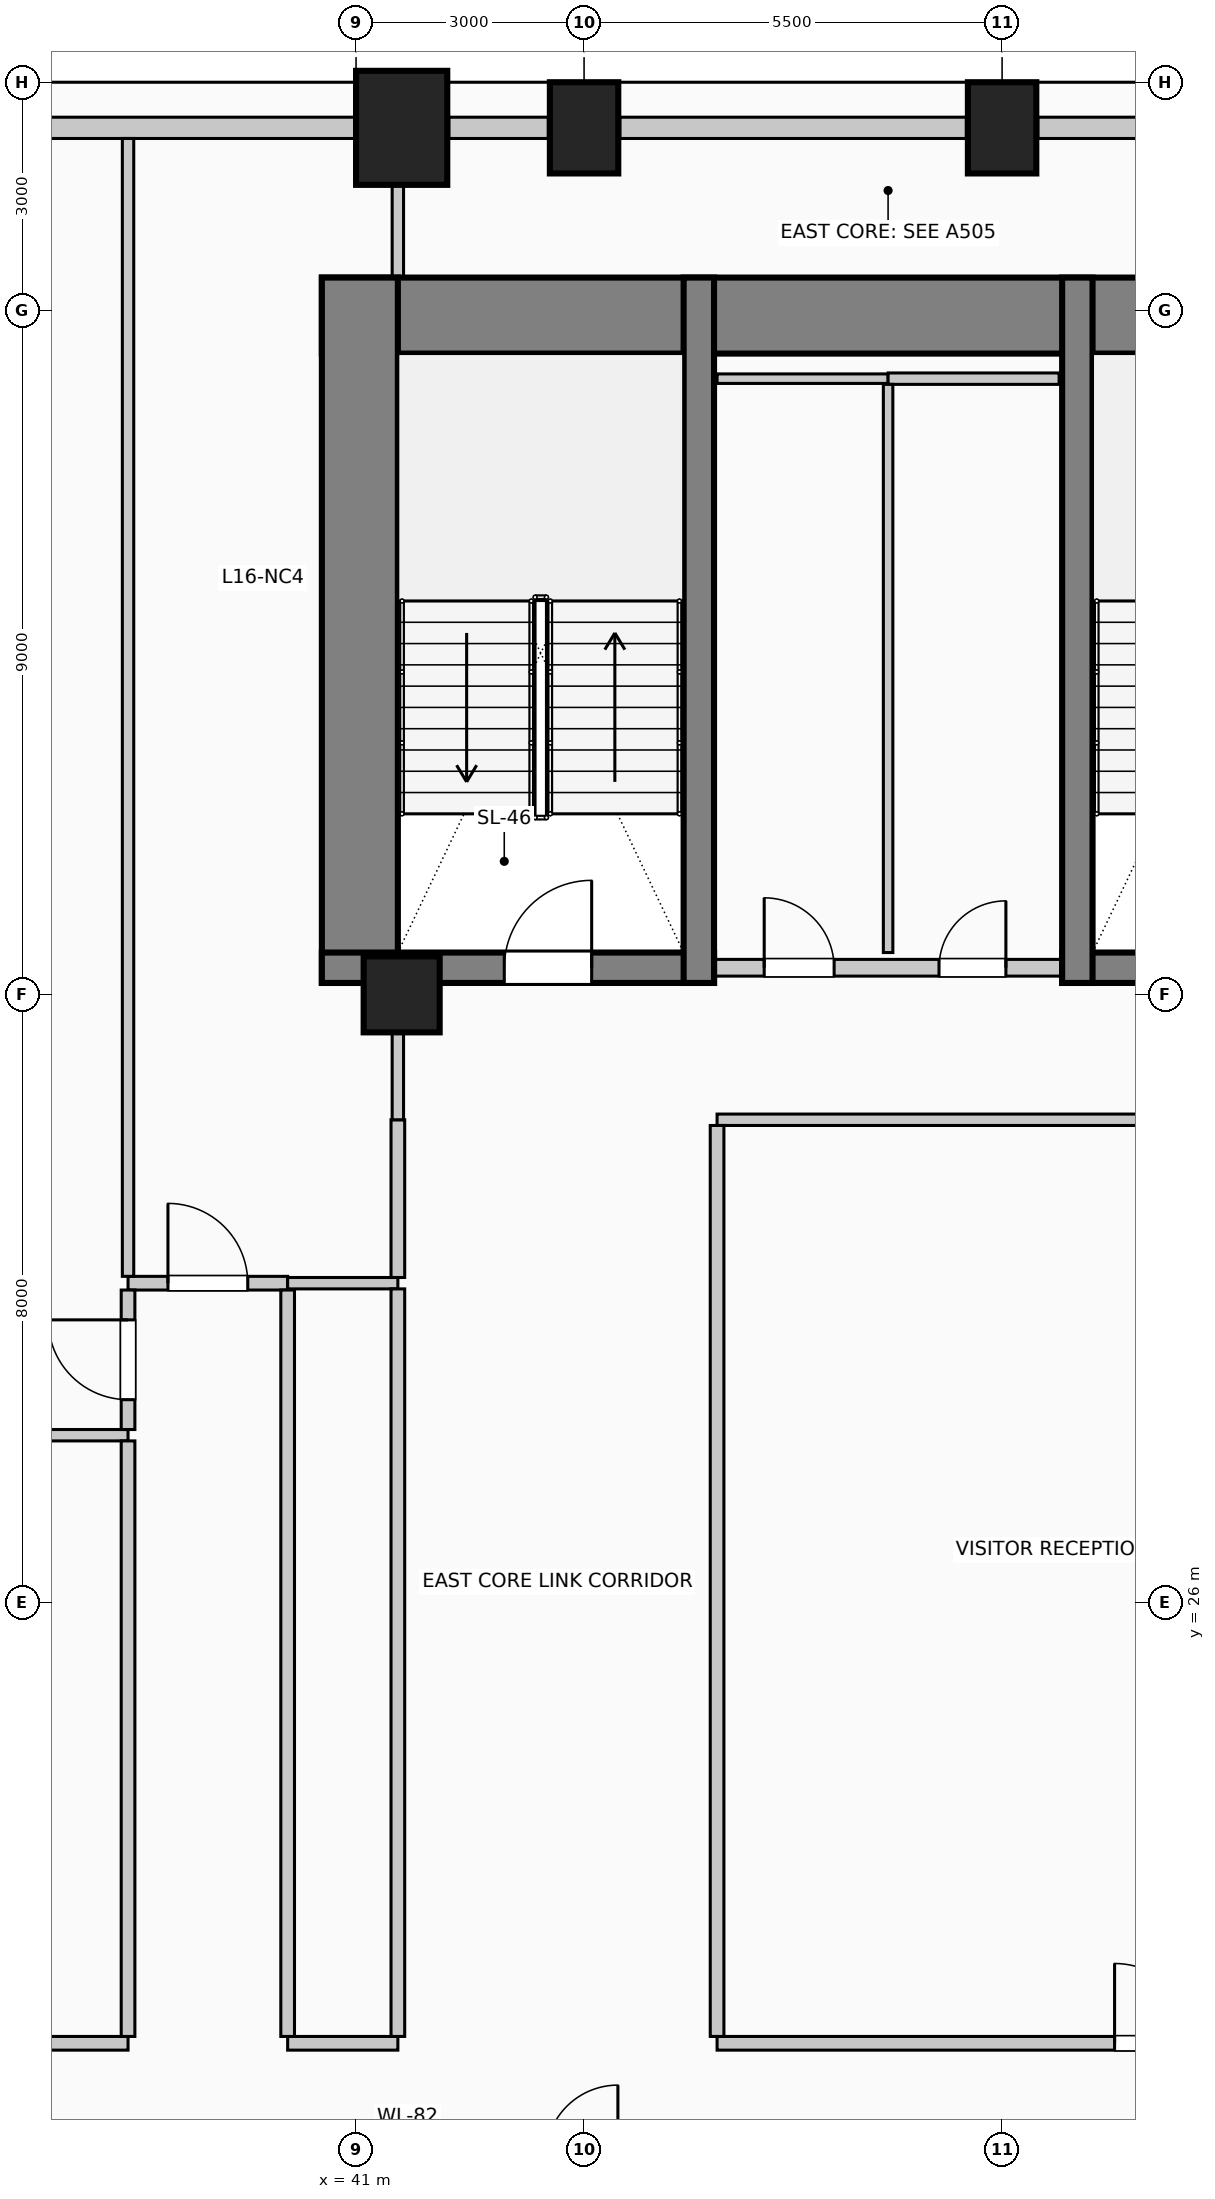
"""IFC4 building model, lengths in metres.
Left out: names, types, materials, properties, quantities, classifications, styles, units other than length and angle.
Written with IfcOpenShell. Run it as: python <this file> out.ifc"""

import sys

from ifc_helpers import new_model, si_unit, direction, frame, frame_2d, origin, origin_2d, place, context, subcontext, project, spatial, rectangle, circle, extrude, element, fill, save


model = new_model("IFC4")
c1 = context("Model", 3, precision=1e-05, world=origin(), true_north=direction((0.0, 1.0)))
c2 = subcontext(c1, "Body", "Model", "MODEL_VIEW")
j1 = project(units=[si_unit("LENGTHUNIT", "METRE"), si_unit("PLANEANGLEUNIT", "RADIAN")], contexts=[c1])
p1 = place(None, origin())
s1 = spatial("IfcSite", under=j1, at=p1, CompositionType="ELEMENT")
p2 = place(p1, origin())
s2 = spatial("IfcBuilding", under=s1, at=p2, CompositionType="ELEMENT")
p3 = place(p2, frame((0.0, 0.0, 66.6)))
s3 = spatial("IfcBuildingStorey", under=s2, at=p3, CompositionType="ELEMENT", Elevation=66.6)
p4 = place(p3, frame((40.55, 42.93, 0.0), z_axis=(0.0, 0.0, 1.0), x_axis=(1.0, 0.0, 0.0)))
e1 = element("IfcWall", 1, at=p4, inside=s3, PredefinedType="SHEAR", context=c2, shape_type="SweptSolid", body=[
    extrude(rectangle(XDim=14.9, YDim=1.0, at=frame_2d((7.45, 0.0))), origin(), (0.0, 0.0, 1.0), 4.0),
])
p5 = place(p3, frame((41.05, 34.15, 0.0), z_axis=(0.0, 0.0, 1.0), x_axis=(0.0, 1.0, 0.0)))
e2 = element("IfcWall", 2, at=p5, inside=s3, PredefinedType="SHEAR", context=c2, shape_type="SweptSolid", body=[
    extrude(rectangle(XDim=9.28, YDim=1.0, at=frame_2d((4.64, 0.0))), origin(), (0.0, 0.0, 1.0), 4.0),
])
p6 = place(p3, frame((40.55, 34.35, 0.0), z_axis=(0.0, 0.0, 1.0), x_axis=(1.0, 0.0, 0.0)))
e3 = element("IfcWall", 3, at=p6, inside=s3, PredefinedType="SHEAR", context=c2, shape_type="SweptSolid", body=[
    extrude(rectangle(XDim=5.16, YDim=0.4, at=frame_2d((2.58, 0.0))), origin(), (0.0, 0.0, 1.0), 4.0),
])
p7 = place(p6, frame((2.4, 0.0, 0.0)))
e4 = element("IfcOpeningElement", 4, at=p7, cuts=e3, PredefinedType="OPENING", context=c2, shape_type="SweptSolid", body=[
    extrude(rectangle(XDim=1.15, YDim=2.2, at=frame_2d((0.575, 1.1))), frame((0.0, 0.21, 0.0), z_axis=(0.0, -1.0, 0.0), x_axis=(1.0, 0.0, 0.0)), (0.0, 0.0, 1.0), 0.42),
])
p8 = place(p3, frame((45.51, 34.15, 0.0), z_axis=(0.0, 0.0, 1.0), x_axis=(0.0, 1.0, 0.0)))
e5 = element("IfcWall", 5, at=p8, inside=s3, PredefinedType="SHEAR", context=c2, shape_type="SweptSolid", body=[
    extrude(rectangle(XDim=9.28, YDim=0.4, at=frame_2d((4.64, 0.0))), origin(), (0.0, 0.0, 1.0), 4.0),
])
p9 = place(p3, frame((50.29, 34.35, 0.0), z_axis=(0.0, 0.0, 1.0), x_axis=(1.0, 0.0, 0.0)))
e6 = element("IfcWall", 6, at=p9, inside=s3, PredefinedType="SHEAR", context=c2, shape_type="SweptSolid", body=[
    extrude(rectangle(XDim=5.16, YDim=0.4, at=frame_2d((2.58, 0.0))), origin(), (0.0, 0.0, 1.0), 4.0),
])
p10 = place(p9, frame((1.4, 0.0, 0.0)))
e7 = element("IfcOpeningElement", 7, at=p10, cuts=e6, PredefinedType="OPENING", context=c2, shape_type="SweptSolid", body=[
    extrude(rectangle(XDim=1.15, YDim=2.2, at=frame_2d((0.575, 1.1))), frame((0.0, 0.21, 0.0), z_axis=(0.0, -1.0, 0.0), x_axis=(1.0, 0.0, 0.0)), (0.0, 0.0, 1.0), 0.42),
])
p11 = place(p3, frame((50.49, 34.15, 0.0), z_axis=(0.0, 0.0, 1.0), x_axis=(0.0, 1.0, 0.0)))
e8 = element("IfcWall", 8, at=p11, inside=s3, PredefinedType="SHEAR", context=c2, shape_type="SweptSolid", body=[
    extrude(rectangle(XDim=9.28, YDim=0.4, at=frame_2d((4.64, 0.0))), origin(), (0.0, 0.0, 1.0), 4.0),
])
p12 = place(p3, frame((41.6, 45.4, 0.0), z_axis=(0.0, 0.0, 1.0), x_axis=(1.0, 0.0, 0.0)))
e9 = element("IfcColumn", 9, at=p12, inside=s3, PredefinedType="COLUMN", context=c2, shape_type="SweptSolid", body=[
    extrude(rectangle(XDim=1.2, YDim=1.5, at=origin_2d()), origin(), (0.0, 0.0, 1.0), 4.0),
])
for number, where, z_axis, x_axis in (
    (10, (44.0, 45.4, 0.0), (0.0, 0.0, 1.0), (1.0, 0.0, 0.0)),
    (11, (49.5, 45.4, 0.0), (0.0, 0.0, 1.0), (1.0, 0.0, 0.0)),
):
    element("IfcColumn", number, at=place(p3, frame(where, z_axis=z_axis, x_axis=x_axis)), inside=s3, PredefinedType="COLUMN", context=c2, shape_type="SweptSolid", body=[
        extrude(rectangle(XDim=0.9, YDim=1.2, at=origin_2d()), origin(), (0.0, 0.0, 1.0), 4.0),
    ])
p13 = place(p3, frame((41.6, 34.0, 0.0), z_axis=(0.0, 0.0, 1.0), x_axis=(1.0, 0.0, 0.0)))
e12 = element("IfcColumn", 12, at=p13, inside=s3, PredefinedType="COLUMN", context=c2, shape_type="SweptSolid", body=[
    extrude(circle(Radius=0.5, at=origin_2d()), origin(), (0.0, 0.0, 1.0), 4.0),
])
p14 = place(p3, frame((34.62, 45.4, 0.0), z_axis=(0.0, 0.0, 1.0), x_axis=(1.0, 0.0, 0.0)))
e13 = element("IfcWall", 13, at=p14, inside=s3, PredefinedType="SOLIDWALL", context=c2, shape_type="SweptSolid", body=[
    extrude(rectangle(XDim=6.36, YDim=0.28, at=frame_2d((3.18, 0.0))), origin(), (0.0, 0.0, 1.0), 2.85),
])
p15 = place(p3, frame((42.22, 45.4, 0.0), z_axis=(0.0, 0.0, 1.0), x_axis=(1.0, 0.0, 0.0)))
e14 = element("IfcWall", 14, at=p15, inside=s3, PredefinedType="SOLIDWALL", context=c2, shape_type="SweptSolid", body=[
    extrude(rectangle(XDim=1.31, YDim=0.28, at=frame_2d((0.655, 0.0))), origin(), (0.0, 0.0, 1.0), 2.85),
])
p16 = place(p3, frame((44.47, 45.4, 0.0), z_axis=(0.0, 0.0, 1.0), x_axis=(1.0, 0.0, 0.0)))
e15 = element("IfcWall", 15, at=p16, inside=s3, PredefinedType="SOLIDWALL", context=c2, shape_type="SweptSolid", body=[
    extrude(rectangle(XDim=4.56, YDim=0.28, at=frame_2d((2.28, 0.0))), origin(), (0.0, 0.0, 1.0), 2.85),
])
p17 = place(p3, frame((49.97, 45.4, 0.0), z_axis=(0.0, 0.0, 1.0), x_axis=(1.0, 0.0, 0.0)))
e16 = element("IfcWall", 16, at=p17, inside=s3, PredefinedType="SOLIDWALL", context=c2, shape_type="SweptSolid", body=[
    extrude(rectangle(XDim=3.96, YDim=0.28, at=frame_2d((1.98, 0.0))), origin(), (0.0, 0.0, 1.0), 2.85),
])
p18 = place(p3, frame((45.72, 34.35, 0.0), z_axis=(0.0, 0.0, 1.0), x_axis=(1.0, 0.0, 0.0)))
e17 = element("IfcWall", 17, at=p18, inside=s3, PredefinedType="PARTITIONING", context=c2, shape_type="SweptSolid", body=[
    extrude(rectangle(XDim=4.56, YDim=0.22, at=frame_2d((2.28, 0.0))), origin(), (0.0, 0.0, 1.0), 3.7),
])
p19 = place(p18, frame((0.65, 0.0, 0.0)))
e18 = element("IfcOpeningElement", 18, at=p19, cuts=e17, PredefinedType="OPENING", context=c2, shape_type="SweptSolid", body=[
    extrude(rectangle(XDim=0.92, YDim=2.1, at=frame_2d((0.46, 1.05))), frame((0.0, 0.12, 0.0), z_axis=(0.0, -1.0, 0.0), x_axis=(1.0, 0.0, 0.0)), (0.0, 0.0, 1.0), 0.24),
])
p20 = place(p18, frame((2.95, 0.0, 0.0)))
e19 = element("IfcOpeningElement", 19, at=p20, cuts=e17, PredefinedType="OPENING", context=c2, shape_type="SweptSolid", body=[
    extrude(rectangle(XDim=0.88, YDim=2.1, at=frame_2d((0.44, 1.05))), frame((0.0, 0.12, 0.0), z_axis=(0.0, -1.0, 0.0), x_axis=(1.0, 0.0, 0.0)), (0.0, 0.0, 1.0), 0.24),
])
p21 = place(p3, frame((16.65, 20.2, 0.0), z_axis=(0.0, 0.0, 1.0), x_axis=(1.0, 0.0, 0.0)))
e20 = element("IfcWall", 20, at=p21, inside=s3, PredefinedType="PARTITIONING", context=c2, shape_type="SweptSolid", body=[
    extrude(rectangle(XDim=21.35, YDim=0.18, at=frame_2d((10.675, 0.0))), origin(), (0.0, 0.0, 1.0), 3.7),
])
p22 = place(p21, frame((10.15, 0.0, 0.0)))
e21 = element("IfcOpeningElement", 21, at=p22, cuts=e20, PredefinedType="OPENING", context=c2, shape_type="SweptSolid", body=[
    extrude(rectangle(XDim=1.05, YDim=2.15, at=frame_2d((0.525, 1.075))), frame((0.0, 0.1, 0.0), z_axis=(0.0, -1.0, 0.0), x_axis=(1.0, 0.0, 0.0)), (0.0, 0.0, 1.0), 0.2),
])
p23 = place(p3, frame((40.1, 20.2, 0.0), z_axis=(0.0, 0.0, 1.0), x_axis=(1.0, 0.0, 0.0)))
e22 = element("IfcWall", 22, at=p23, inside=s3, PredefinedType="PARTITIONING", context=c2, shape_type="SweptSolid", body=[
    extrude(rectangle(XDim=1.45, YDim=0.18, at=frame_2d((0.725, 0.0))), origin(), (0.0, 0.0, 1.0), 3.7),
])
p24 = place(p3, frame((45.75, 20.2, 0.0), z_axis=(0.0, 0.0, 1.0), x_axis=(1.0, 0.0, 0.0)))
e23 = element("IfcWall", 23, at=p24, inside=s3, PredefinedType="PARTITIONING", context=c2, shape_type="SweptSolid", body=[
    extrude(rectangle(XDim=11.51, YDim=0.18, at=frame_2d((5.755, 0.0))), origin(), (0.0, 0.0, 1.0), 3.7),
])
p25 = place(p24, frame((5.23, 0.0, 0.0)))
e24 = element("IfcOpeningElement", 24, at=p25, cuts=e23, PredefinedType="OPENING", context=c2, shape_type="SweptSolid", body=[
    extrude(rectangle(XDim=1.05, YDim=2.15, at=frame_2d((0.525, 1.075))), frame((0.0, 0.1, 0.0), z_axis=(0.0, -1.0, 0.0), x_axis=(1.0, 0.0, 0.0)), (0.0, 0.0, 1.0), 0.2),
])
p26 = place(p3, frame((16.65, 28.2, 0.0), z_axis=(0.0, 0.0, 1.0), x_axis=(1.0, 0.0, 0.0)))
e25 = element("IfcWall", 25, at=p26, inside=s3, PredefinedType="PARTITIONING", context=c2, shape_type="SweptSolid", body=[
    extrude(rectangle(XDim=21.35, YDim=0.15, at=frame_2d((10.675, 0.0))), origin(), (0.0, 0.0, 1.0), 3.7),
])
p27 = place(p3, frame((38.0, 30.2, 0.0), z_axis=(0.0, 0.0, 1.0), x_axis=(1.0, 0.0, 0.0)))
e26 = element("IfcWall", 26, at=p27, inside=s3, PredefinedType="PARTITIONING", context=c2, shape_type="SweptSolid", body=[
    extrude(rectangle(XDim=2.1, YDim=0.18, at=frame_2d((1.05, 0.0))), origin(), (0.0, 0.0, 1.0), 3.7),
])
p28 = place(p27, frame((0.525, 0.0, 0.0)))
e27 = element("IfcOpeningElement", 27, at=p28, cuts=e26, PredefinedType="OPENING", context=c2, shape_type="SweptSolid", body=[
    extrude(rectangle(XDim=1.05, YDim=2.15, at=frame_2d((0.525, 1.075))), frame((0.0, 0.1, 0.0), z_axis=(0.0, -1.0, 0.0), x_axis=(1.0, 0.0, 0.0)), (0.0, 0.0, 1.0), 0.2),
])
p29 = place(p3, frame((40.1, 30.2, 0.0), z_axis=(0.0, 0.0, 1.0), x_axis=(1.0, 0.0, 0.0)))
e28 = element("IfcWall", 28, at=p29, inside=s3, PredefinedType="PARTITIONING", context=c2, shape_type="SweptSolid", body=[
    extrude(rectangle(XDim=1.45, YDim=0.15, at=frame_2d((0.725, 0.0))), origin(), (0.0, 0.0, 1.0), 3.7),
])
p30 = place(p3, frame((45.75, 32.35, 0.0), z_axis=(0.0, 0.0, 1.0), x_axis=(1.0, 0.0, 0.0)))
e29 = element("IfcWall", 29, at=p30, inside=s3, PredefinedType="PARTITIONING", context=c2, shape_type="SweptSolid", body=[
    extrude(rectangle(XDim=8.7, YDim=0.15, at=frame_2d((4.35, 0.0))), origin(), (0.0, 0.0, 1.0), 3.7),
])
p31 = place(p3, frame((45.75, 42.1, 0.0), z_axis=(0.0, 0.0, 1.0), x_axis=(1.0, 0.0, 0.0)))
e30 = element("IfcWall", 30, at=p31, inside=s3, PredefinedType="PARTITIONING", context=c2, shape_type="SweptSolid", body=[
    extrude(rectangle(XDim=2.25, YDim=0.125, at=frame_2d((1.125, 0.0))), origin(), (0.0, 0.0, 1.0), 3.7),
])
p32 = place(p3, frame((48.0, 42.1, 0.0), z_axis=(0.0, 0.0, 1.0), x_axis=(1.0, 0.0, 0.0)))
e31 = element("IfcWall", 31, at=p32, inside=s3, PredefinedType="PARTITIONING", context=c2, shape_type="SweptSolid", body=[
    extrude(rectangle(XDim=2.25, YDim=0.15, at=frame_2d((1.125, 0.0))), origin(), (0.0, 0.0, 1.0), 3.7),
])
p33 = place(p3, frame((38.0, 20.29, 0.0), z_axis=(0.0, 0.0, 1.0), x_axis=(0.0, 1.0, 0.0)))
e32 = element("IfcWall", 32, at=p33, inside=s3, PredefinedType="PARTITIONING", context=c2, shape_type="SweptSolid", body=[
    extrude(rectangle(XDim=7.835, YDim=0.18, at=frame_2d((3.917, 0.0))), origin(), (0.0, 0.0, 1.0), 3.7),
])
p34 = place(p3, frame((38.0, 28.275, 0.0), z_axis=(0.0, 0.0, 1.0), x_axis=(0.0, 1.0, 0.0)))
e33 = element("IfcWall", 33, at=p34, inside=s3, PredefinedType="PARTITIONING", context=c2, shape_type="SweptSolid", body=[
    extrude(rectangle(XDim=1.835, YDim=0.18, at=frame_2d((0.917, 0.0))), origin(), (0.0, 0.0, 1.0), 3.7),
])
p35 = place(p34, frame((0.393, 0.0, 0.0)))
e34 = element("IfcOpeningElement", 34, at=p35, cuts=e33, PredefinedType="OPENING", context=c2, shape_type="SweptSolid", body=[
    extrude(rectangle(XDim=1.05, YDim=2.15, at=frame_2d((0.525, 1.075))), frame((0.0, 0.1, 0.0), z_axis=(0.0, -1.0, 0.0), x_axis=(1.0, 0.0, 0.0)), (0.0, 0.0, 1.0), 0.2),
])
p36 = place(p3, frame((38.0, 30.29, 0.0), z_axis=(0.0, 0.0, 1.0), x_axis=(0.0, 1.0, 0.0)))
e35 = element("IfcWall", 35, at=p36, inside=s3, PredefinedType="PARTITIONING", context=c2, shape_type="SweptSolid", body=[
    extrude(rectangle(XDim=14.97, YDim=0.15, at=frame_2d((7.485, 0.0))), origin(), (0.0, 0.0, 1.0), 3.7),
])
p37 = place(p3, frame((40.1, 20.29, 0.0), z_axis=(0.0, 0.0, 1.0), x_axis=(0.0, 1.0, 0.0)))
e36 = element("IfcWall", 36, at=p37, inside=s3, PredefinedType="PARTITIONING", context=c2, shape_type="SweptSolid", body=[
    extrude(rectangle(XDim=9.82, YDim=0.18, at=frame_2d((4.91, 0.0))), origin(), (0.0, 0.0, 1.0), 3.7),
])
p38 = place(p3, frame((41.55, 20.29, 0.0), z_axis=(0.0, 0.0, 1.0), x_axis=(0.0, 1.0, 0.0)))
e37 = element("IfcWall", 37, at=p38, inside=s3, PredefinedType="PARTITIONING", context=c2, shape_type="SweptSolid", body=[
    extrude(rectangle(XDim=9.835, YDim=0.18, at=frame_2d((4.917, 0.0))), origin(), (0.0, 0.0, 1.0), 2.995),
])
p39 = place(p3, frame((41.55, 30.275, 0.0), z_axis=(0.0, 0.0, 1.0), x_axis=(0.0, 1.0, 0.0)))
e38 = element("IfcWall", 38, at=p39, inside=s3, PredefinedType="PARTITIONING", context=c2, shape_type="SweptSolid", body=[
    extrude(rectangle(XDim=2.075, YDim=0.18, at=frame_2d((1.038, 0.0))), origin(), (0.0, 0.0, 1.0), 2.995),
])
p40 = place(p3, frame((41.55, 32.35, 0.0), z_axis=(0.0, 0.0, 1.0), x_axis=(0.0, 1.0, 0.0)))
e39 = element("IfcWall", 39, at=p40, inside=s3, PredefinedType="PARTITIONING", context=c2, shape_type="SweptSolid", body=[
    extrude(rectangle(XDim=1.15, YDim=0.15, at=frame_2d((0.575, 0.0))), origin(), (0.0, 0.0, 1.0), 2.995),
])
p41 = place(p3, frame((41.55, 43.43, 0.0), z_axis=(0.0, 0.0, 1.0), x_axis=(0.0, 1.0, 0.0)))
e40 = element("IfcWall", 40, at=p41, inside=s3, PredefinedType="PARTITIONING", context=c2, shape_type="SweptSolid", body=[
    extrude(rectangle(XDim=1.22, YDim=0.15, at=frame_2d((0.61, 0.0))), origin(), (0.0, 0.0, 1.0), 3.7),
])
p42 = place(p3, frame((45.75, 20.29, 0.0), z_axis=(0.0, 0.0, 1.0), x_axis=(0.0, 1.0, 0.0)))
e41 = element("IfcWall", 41, at=p42, inside=s3, PredefinedType="PARTITIONING", context=c2, shape_type="SweptSolid", body=[
    extrude(rectangle(XDim=11.985, YDim=0.18, at=frame_2d((5.992, 0.0))), origin(), (0.0, 0.0, 1.0), 3.7),
])
p43 = place(p3, frame((48.0, 34.55, 0.0), z_axis=(0.0, 0.0, 1.0), x_axis=(0.0, 1.0, 0.0)))
e42 = element("IfcWall", 42, at=p43, inside=s3, PredefinedType="PARTITIONING", context=c2, shape_type="SweptSolid", body=[
    extrude(rectangle(XDim=7.475, YDim=0.125, at=frame_2d((3.737, 0.0))), origin(), (0.0, 0.0, 1.0), 3.7),
])
p44 = place(p7, origin())
e43 = element("IfcDoor", 43, at=p44, inside=s3, OperationType="SINGLE_SWING_RIGHT", PredefinedType="DOOR", context=c2, shape_type="SweptSolid", body=[
    extrude(rectangle(XDim=1.15, YDim=2.2, at=frame_2d((0.575, 1.1))), frame((0.0, 0.025, 0.0), z_axis=(0.0, -1.0, 0.0), x_axis=(1.0, 0.0, 0.0)), (0.0, 0.0, 1.0), 0.05),
])
fill(e4, e43)
p45 = place(p19, origin())
e44 = element("IfcDoor", 44, at=p45, inside=s3, OperationType="SINGLE_SWING_LEFT", PredefinedType="DOOR", context=c2, shape_type="SweptSolid", body=[
    extrude(rectangle(XDim=0.92, YDim=2.1, at=frame_2d((0.46, 1.05))), frame((0.0, 0.025, 0.0), z_axis=(0.0, -1.0, 0.0), x_axis=(1.0, 0.0, 0.0)), (0.0, 0.0, 1.0), 0.05),
])
fill(e18, e44)
p46 = place(p20, origin())
e45 = element("IfcDoor", 45, at=p46, inside=s3, OperationType="SINGLE_SWING_RIGHT", PredefinedType="DOOR", context=c2, shape_type="SweptSolid", body=[
    extrude(rectangle(XDim=0.88, YDim=2.1, at=frame_2d((0.44, 1.05))), frame((0.0, 0.025, 0.0), z_axis=(0.0, -1.0, 0.0), x_axis=(1.0, 0.0, 0.0)), (0.0, 0.0, 1.0), 0.05),
])
fill(e19, e45)
p47 = place(p25, origin())
e46 = element("IfcDoor", 46, at=p47, inside=s3, OperationType="SINGLE_SWING_LEFT", PredefinedType="DOOR", context=c2, shape_type="SweptSolid", body=[
    extrude(rectangle(XDim=1.05, YDim=2.15, at=frame_2d((0.525, 1.075))), frame((0.0, 0.025, 0.0), z_axis=(0.0, -1.0, 0.0), x_axis=(1.0, 0.0, 0.0)), (0.0, 0.0, 1.0), 0.05),
])
fill(e24, e46)
p48 = place(p28, origin())
e47 = element("IfcDoor", 47, at=p48, inside=s3, OperationType="SINGLE_SWING_LEFT", PredefinedType="DOOR", context=c2, shape_type="SweptSolid", body=[
    extrude(rectangle(XDim=1.05, YDim=2.15, at=frame_2d((0.525, 1.075))), frame((0.0, 0.025, 0.0), z_axis=(0.0, -1.0, 0.0), x_axis=(1.0, 0.0, 0.0)), (0.0, 0.0, 1.0), 0.05),
])
fill(e27, e47)
p49 = place(p35, origin())
e48 = element("IfcDoor", 48, at=p49, inside=s3, OperationType="SINGLE_SWING_RIGHT", PredefinedType="DOOR", context=c2, shape_type="SweptSolid", body=[
    extrude(rectangle(XDim=1.05, YDim=2.15, at=frame_2d((0.525, 1.075))), frame((0.0, 0.025, 0.0), z_axis=(0.0, -1.0, 0.0), x_axis=(1.0, 0.0, 0.0)), (0.0, 0.0, 1.0), 0.05),
])
fill(e34, e48)
save(model, sys.argv[1])
